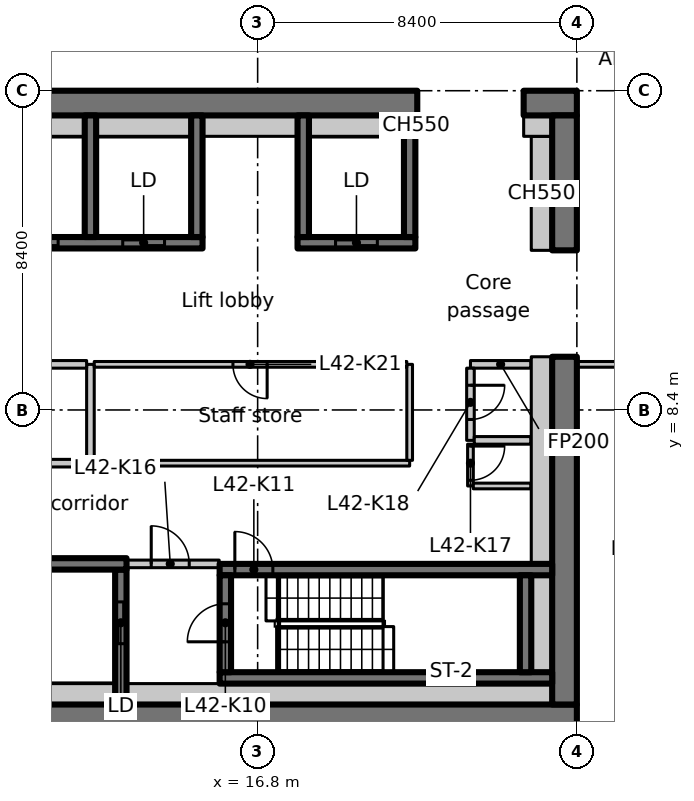
"""IFC4 building model, lengths in metres.
Left out: names, types, materials, properties, quantities, classifications, styles, units other than length and angle.
Written with IfcOpenShell. Run it as: python <this file> out.ifc"""

import sys

from ifc_helpers import new_model, si_unit, direction, frame, frame_2d, origin, place, context, subcontext, project, spatial, rectangle, extrude, element, fill, save


model = new_model("IFC4")
c1 = context("Model", 3, precision=1e-05, world=origin(), true_north=direction((0.0, 1.0)))
c2 = subcontext(c1, "Body", "Model", "MODEL_VIEW")
j1 = project(units=[si_unit("LENGTHUNIT", "METRE"), si_unit("PLANEANGLEUNIT", "RADIAN")], contexts=[c1])
p1 = place(None, origin())
s1 = spatial("IfcSite", under=j1, at=p1, CompositionType="ELEMENT")
p2 = place(p1, origin())
s2 = spatial("IfcBuilding", under=s1, at=p2, CompositionType="ELEMENT")
p3 = place(p2, frame((0.0, 0.0, 170.4)))
s3 = spatial("IfcBuildingStorey", under=s2, at=p3, CompositionType="ELEMENT", Elevation=170.4)
p4 = place(p3, frame((7.286, 0.325, 0.0), z_axis=(0.0, 0.0, 1.0), x_axis=(1.0, 0.0, 0.0)))
e1 = element("IfcWall", 1, at=p4, inside=s3, PredefinedType="SHEAR", context=c2, shape_type="SweptSolid", body=[
    extrude(rectangle(XDim=17.914, YDim=0.65, at=frame_2d((8.957, 0.0))), origin(), (0.0, 0.0, 1.0), 3.35),
])
p5 = place(p3, frame((-1.1, 16.475, 0.0), z_axis=(0.0, 0.0, 1.0), x_axis=(1.0, 0.0, 0.0)))
e2 = element("IfcWall", 2, at=p5, inside=s3, PredefinedType="SHEAR", context=c2, shape_type="SweptSolid", body=[
    extrude(rectangle(XDim=22.1, YDim=0.65, at=frame_2d((11.05, 0.0))), origin(), (0.0, 0.0, 1.0), 3.35),
])
p6 = place(p5, frame((3.15, 0.0, 0.0)))
e3 = element("IfcOpeningElement", 3, at=p6, cuts=e2, PredefinedType="OPENING", context=c2, shape_type="SweptSolid", body=[
    extrude(rectangle(XDim=1.1, YDim=2.3, at=frame_2d((0.55, 1.15))), frame((0.0, 0.335, 0.0), z_axis=(0.0, -1.0, 0.0), x_axis=(1.0, 0.0, 0.0)), (0.0, 0.0, 1.0), 0.67),
])
p7 = place(p3, frame((23.8, 16.475, 0.0), z_axis=(0.0, 0.0, 1.0), x_axis=(1.0, 0.0, 0.0)))
e4 = element("IfcWall", 4, at=p7, inside=s3, PredefinedType="SHEAR", context=c2, shape_type="SweptSolid", body=[
    extrude(rectangle(XDim=1.4, YDim=0.65, at=frame_2d((0.7, 0.0))), origin(), (0.0, 0.0, 1.0), 3.35),
])
p8 = place(p3, frame((24.875, 0.65, 0.0), z_axis=(0.0, 0.0, 1.0), x_axis=(0.0, 1.0, 0.0)))
e5 = element("IfcWall", 5, at=p8, inside=s3, PredefinedType="SHEAR", context=c2, shape_type="SweptSolid", body=[
    extrude(rectangle(XDim=9.15, YDim=0.65, at=frame_2d((4.575, 0.0))), origin(), (0.0, 0.0, 1.0), 3.35),
])
p9 = place(p3, frame((24.875, 12.6, 0.0), z_axis=(0.0, 0.0, 1.0), x_axis=(0.0, 1.0, 0.0)))
e6 = element("IfcWall", 6, at=p9, inside=s3, PredefinedType="SHEAR", context=c2, shape_type="SweptSolid", body=[
    extrude(rectangle(XDim=3.55, YDim=0.65, at=frame_2d((1.775, 0.0))), origin(), (0.0, 0.0, 1.0), 3.35),
])
p10 = place(p3, frame((24.275, 12.6, 0.0), z_axis=(0.0, 0.0, 1.0), x_axis=(0.0, 1.0, 0.0)))
e7 = element("IfcWall", 7, at=p10, inside=s3, PredefinedType="PARTITIONING", context=c2, shape_type="SweptSolid", body=[
    extrude(rectangle(XDim=3.0, YDim=0.55, at=frame_2d((1.5, 0.0))), origin(), (0.0, 0.0, 1.0), 3.35),
])
p11 = place(p3, frame((23.8, 15.875, 0.0), z_axis=(0.0, 0.0, 1.0), x_axis=(1.0, 0.0, 0.0)))
e8 = element("IfcWall", 8, at=p11, inside=s3, PredefinedType="PARTITIONING", context=c2, shape_type="SweptSolid", body=[
    extrude(rectangle(XDim=0.75, YDim=0.55, at=frame_2d((0.375, 0.0))), origin(), (0.0, 0.0, 1.0), 3.35),
])
p12 = place(p3, frame((0.65, 12.8, 0.0), z_axis=(0.0, 0.0, 1.0), x_axis=(1.0, 0.0, 0.0)))
e9 = element("IfcWall", 9, at=p12, inside=s3, PredefinedType="SHEAR", context=c2, shape_type="SweptSolid", body=[
    extrude(rectangle(XDim=14.7, YDim=0.3, at=frame_2d((7.35, 0.0))), origin(), (0.0, 0.0, 1.0), 3.35),
])
p13 = place(p12, frame((4.2, 0.0, 0.0)))
e10 = element("IfcOpeningElement", 10, at=p13, cuts=e9, PredefinedType="OPENING", context=c2, shape_type="SweptSolid", body=[
    extrude(rectangle(XDim=1.1, YDim=2.3, at=frame_2d((0.55, 1.15))), frame((0.0, 0.16, 0.0), z_axis=(0.0, -1.0, 0.0), x_axis=(1.0, 0.0, 0.0)), (0.0, 0.0, 1.0), 0.32),
])
p14 = place(p12, frame((7.0, 0.0, 0.0)))
e11 = element("IfcOpeningElement", 11, at=p14, cuts=e9, PredefinedType="OPENING", context=c2, shape_type="SweptSolid", body=[
    extrude(rectangle(XDim=1.1, YDim=2.3, at=frame_2d((0.55, 1.15))), frame((0.0, 0.16, 0.0), z_axis=(0.0, -1.0, 0.0), x_axis=(1.0, 0.0, 0.0)), (0.0, 0.0, 1.0), 0.32),
])
p15 = place(p12, frame((9.8, 0.0, 0.0)))
e12 = element("IfcOpeningElement", 12, at=p15, cuts=e9, PredefinedType="OPENING", context=c2, shape_type="SweptSolid", body=[
    extrude(rectangle(XDim=1.1, YDim=2.3, at=frame_2d((0.55, 1.15))), frame((0.0, 0.16, 0.0), z_axis=(0.0, -1.0, 0.0), x_axis=(1.0, 0.0, 0.0)), (0.0, 0.0, 1.0), 0.32),
])
p16 = place(p12, frame((12.6, 0.0, 0.0)))
e13 = element("IfcOpeningElement", 13, at=p16, cuts=e9, PredefinedType="OPENING", context=c2, shape_type="SweptSolid", body=[
    extrude(rectangle(XDim=1.1, YDim=2.3, at=frame_2d((0.55, 1.15))), frame((0.0, 0.16, 0.0), z_axis=(0.0, -1.0, 0.0), x_axis=(1.0, 0.0, 0.0)), (0.0, 0.0, 1.0), 0.32),
])
for number, where, z_axis, x_axis in (
    (14, (12.4, 12.95, 0.0), (0.0, 0.0, 1.0), (0.0, 1.0, 0.0)),
    (15, (15.2, 12.95, 0.0), (0.0, 0.0, 1.0), (0.0, 1.0, 0.0)),
):
    element("IfcWall", number, at=place(p3, frame(where, z_axis=z_axis, x_axis=x_axis)), inside=s3, PredefinedType="SHEAR", context=c2, shape_type="SweptSolid", body=[
        extrude(rectangle(XDim=3.2, YDim=0.3, at=frame_2d((1.6, 0.0))), origin(), (0.0, 0.0, 1.0), 3.35),
    ])
p17 = place(p3, frame((17.85, 12.8, 0.0), z_axis=(0.0, 0.0, 1.0), x_axis=(1.0, 0.0, 0.0)))
e16 = element("IfcWall", 16, at=p17, inside=s3, PredefinedType="SHEAR", context=c2, shape_type="SweptSolid", body=[
    extrude(rectangle(XDim=3.1, YDim=0.3, at=frame_2d((1.55, 0.0))), origin(), (0.0, 0.0, 1.0), 3.35),
])
p18 = place(p17, frame((1.0, 0.0, 0.0)))
e17 = element("IfcOpeningElement", 17, at=p18, cuts=e16, PredefinedType="OPENING", context=c2, shape_type="SweptSolid", body=[
    extrude(rectangle(XDim=1.1, YDim=2.3, at=frame_2d((0.55, 1.15))), frame((0.0, 0.16, 0.0), z_axis=(0.0, -1.0, 0.0), x_axis=(1.0, 0.0, 0.0)), (0.0, 0.0, 1.0), 0.32),
])
for number, where, z_axis, x_axis in (
    (18, (18.0, 12.95, 0.0), (0.0, 0.0, 1.0), (0.0, 1.0, 0.0)),
    (19, (20.8, 12.95, 0.0), (0.0, 0.0, 1.0), (0.0, 1.0, 0.0)),
):
    element("IfcWall", number, at=place(p3, frame(where, z_axis=z_axis, x_axis=x_axis)), inside=s3, PredefinedType="SHEAR", context=c2, shape_type="SweptSolid", body=[
        extrude(rectangle(XDim=3.2, YDim=0.3, at=frame_2d((1.6, 0.0))), origin(), (0.0, 0.0, 1.0), 3.35),
    ])
p19 = place(p3, frame((13.2, 0.65, 0.0), z_axis=(0.0, 0.0, 1.0), x_axis=(0.0, 1.0, 0.0)))
e20 = element("IfcWall", 20, at=p19, inside=s3, PredefinedType="SHEAR", context=c2, shape_type="SweptSolid", body=[
    extrude(rectangle(XDim=3.55, YDim=0.3, at=frame_2d((1.775, 0.0))), origin(), (0.0, 0.0, 1.0), 3.35),
])
p20 = place(p19, frame((1.6, 0.0, 0.0)))
e21 = element("IfcOpeningElement", 21, at=p20, cuts=e20, PredefinedType="OPENING", context=c2, shape_type="SweptSolid", body=[
    extrude(rectangle(XDim=1.1, YDim=2.3, at=frame_2d((0.55, 1.15))), frame((0.0, 0.16, 0.0), z_axis=(0.0, -1.0, 0.0), x_axis=(1.0, 0.0, 0.0)), (0.0, 0.0, 1.0), 0.32),
])
p21 = place(p3, frame((10.05, 4.35, 0.0), z_axis=(0.0, 0.0, 1.0), x_axis=(1.0, 0.0, 0.0)))
e22 = element("IfcWall", 22, at=p21, inside=s3, PredefinedType="SHEAR", context=c2, shape_type="SweptSolid", body=[
    extrude(rectangle(XDim=3.3, YDim=0.3, at=frame_2d((1.65, 0.0))), origin(), (0.0, 0.0, 1.0), 3.35),
])
p22 = place(p3, frame((15.8, 1.35, 0.0), z_axis=(0.0, 0.0, 1.0), x_axis=(1.0, 0.0, 0.0)))
e23 = element("IfcWall", 23, at=p22, inside=s3, PredefinedType="SHEAR", context=c2, shape_type="SweptSolid", body=[
    extrude(rectangle(XDim=8.75, YDim=0.3, at=frame_2d((4.375, 0.0))), origin(), (0.0, 0.0, 1.0), 3.35),
])
p23 = place(p3, frame((15.8, 4.2, 0.0), z_axis=(0.0, 0.0, 1.0), x_axis=(1.0, 0.0, 0.0)))
e24 = element("IfcWall", 24, at=p23, inside=s3, PredefinedType="SHEAR", context=c2, shape_type="SweptSolid", body=[
    extrude(rectangle(XDim=8.75, YDim=0.3, at=frame_2d((4.375, 0.0))), origin(), (0.0, 0.0, 1.0), 3.35),
])
p24 = place(p23, frame((0.4, 0.0, 0.0)))
e25 = element("IfcOpeningElement", 25, at=p24, cuts=e24, PredefinedType="OPENING", context=c2, shape_type="SweptSolid", body=[
    extrude(rectangle(XDim=1.0, YDim=2.1, at=frame_2d((0.5, 1.05))), frame((0.0, 0.16, 0.0), z_axis=(0.0, -1.0, 0.0), x_axis=(1.0, 0.0, 0.0)), (0.0, 0.0, 1.0), 0.32),
])
p25 = place(p3, frame((15.95, 1.5, 0.0), z_axis=(0.0, 0.0, 1.0), x_axis=(0.0, 1.0, 0.0)))
e26 = element("IfcWall", 26, at=p25, inside=s3, PredefinedType="SHEAR", context=c2, shape_type="SweptSolid", body=[
    extrude(rectangle(XDim=2.55, YDim=0.3, at=frame_2d((1.275, 0.0))), origin(), (0.0, 0.0, 1.0), 3.35),
])
p26 = place(p25, frame((0.8, 0.0, 0.0)))
e27 = element("IfcOpeningElement", 27, at=p26, cuts=e26, PredefinedType="OPENING", context=c2, shape_type="SweptSolid", body=[
    extrude(rectangle(XDim=1.0, YDim=2.1, at=frame_2d((0.5, 1.05))), frame((0.0, 0.16, 0.0), z_axis=(0.0, -1.0, 0.0), x_axis=(1.0, 0.0, 0.0)), (0.0, 0.0, 1.0), 0.32),
])
p27 = place(p3, frame((23.85, 1.5, 0.0), z_axis=(0.0, 0.0, 1.0), x_axis=(0.0, 1.0, 0.0)))
e28 = element("IfcWall", 28, at=p27, inside=s3, PredefinedType="SHEAR", context=c2, shape_type="SweptSolid", body=[
    extrude(rectangle(XDim=2.55, YDim=0.3, at=frame_2d((1.275, 0.0))), origin(), (0.0, 0.0, 1.0), 3.35),
])
p28 = place(p3, frame((13.362, 4.35, 0.0), z_axis=(0.0, 0.0, 1.0), x_axis=(1.0, 0.0, 0.0)))
e29 = element("IfcWall", 29, at=p28, inside=s3, PredefinedType="PARTITIONING", context=c2, shape_type="SweptSolid", body=[
    extrude(rectangle(XDim=2.426, YDim=0.2, at=frame_2d((1.213, 0.0))), origin(), (0.0, 0.0, 1.0), 3.35),
])
p29 = place(p28, frame((0.638, 0.0, 0.0)))
e30 = element("IfcOpeningElement", 30, at=p29, cuts=e29, PredefinedType="OPENING", context=c2, shape_type="SweptSolid", body=[
    extrude(rectangle(XDim=1.0, YDim=2.1, at=frame_2d((0.5, 1.05))), frame((0.0, 0.11, 0.0), z_axis=(0.0, -1.0, 0.0), x_axis=(1.0, 0.0, 0.0)), (0.0, 0.0, 1.0), 0.22),
])
p30 = place(p3, frame((23.988, 9.6, 0.0), z_axis=(0.0, 0.0, 1.0), x_axis=(-1.0, 0.0, 0.0)))
e31 = element("IfcWall", 31, at=p30, inside=s3, PredefinedType="PARTITIONING", context=c2, shape_type="SweptSolid", body=[
    extrude(rectangle(XDim=1.588, YDim=0.2, at=frame_2d((0.794, 0.0))), origin(), (0.0, 0.0, 1.0), 3.35),
])
p31 = place(p3, frame((22.4, 9.5, 0.0), z_axis=(0.0, 0.0, 1.0), x_axis=(0.0, -1.0, 0.0)))
e32 = element("IfcWall", 32, at=p31, inside=s3, PredefinedType="PARTITIONING", context=c2, shape_type="SweptSolid", body=[
    extrude(rectangle(XDim=1.9, YDim=0.2, at=frame_2d((0.95, 0.0))), origin(), (0.0, 0.0, 1.0), 3.35),
])
p32 = place(p31, frame((0.45, 0.0, 0.0)))
e33 = element("IfcOpeningElement", 33, at=p32, cuts=e32, PredefinedType="OPENING", context=c2, shape_type="SweptSolid", body=[
    extrude(rectangle(XDim=0.9, YDim=2.1, at=frame_2d((0.45, 1.05))), frame((0.0, 0.11, 0.0), z_axis=(0.0, -1.0, 0.0), x_axis=(1.0, 0.0, 0.0)), (0.0, 0.0, 1.0), 0.22),
])
p33 = place(p3, frame((22.5, 7.6, 0.0), z_axis=(0.0, 0.0, 1.0), x_axis=(1.0, 0.0, 0.0)))
e34 = element("IfcWall", 34, at=p33, inside=s3, PredefinedType="PARTITIONING", context=c2, shape_type="SweptSolid", body=[
    extrude(rectangle(XDim=1.488, YDim=0.2, at=frame_2d((0.744, 0.0))), origin(), (0.0, 0.0, 1.0), 3.35),
])
p34 = place(p3, frame((6.8, 7.0, 0.0), z_axis=(0.0, 0.0, 1.0), x_axis=(1.0, 0.0, 0.0)))
e35 = element("IfcWall", 35, at=p34, inside=s3, PredefinedType="PARTITIONING", context=c2, shape_type="SweptSolid", body=[
    extrude(rectangle(XDim=5.6, YDim=0.2, at=frame_2d((2.8, 0.0))), origin(), (0.0, 0.0, 1.0), 3.35),
])
p35 = place(p3, frame((12.4, 7.1, 0.0), z_axis=(0.0, 0.0, 1.0), x_axis=(0.0, 1.0, 0.0)))
e36 = element("IfcWall", 36, at=p35, inside=s3, PredefinedType="PARTITIONING", context=c2, shape_type="SweptSolid", body=[
    extrude(rectangle(XDim=2.5, YDim=0.2, at=frame_2d((1.25, 0.0))), origin(), (0.0, 0.0, 1.0), 3.35),
])
p36 = place(p3, frame((12.3, 9.6, 0.0), z_axis=(0.0, 0.0, 1.0), x_axis=(-1.0, 0.0, 0.0)))
e37 = element("IfcWall", 37, at=p36, inside=s3, PredefinedType="PARTITIONING", context=c2, shape_type="SweptSolid", body=[
    extrude(rectangle(XDim=5.5, YDim=0.2, at=frame_2d((2.75, 0.0))), origin(), (0.0, 0.0, 1.0), 3.35),
])
p37 = place(p36, frame((2.25, 0.0, 0.0)))
e38 = element("IfcOpeningElement", 38, at=p37, cuts=e37, PredefinedType="OPENING", context=c2, shape_type="SweptSolid", body=[
    extrude(rectangle(XDim=0.9, YDim=2.1, at=frame_2d((0.45, 1.05))), frame((0.0, 0.11, 0.0), z_axis=(0.0, -1.0, 0.0), x_axis=(1.0, 0.0, 0.0)), (0.0, 0.0, 1.0), 0.22),
])
p38 = place(p3, frame((12.5, 7.0, 0.0), z_axis=(0.0, 0.0, 1.0), x_axis=(1.0, 0.0, 0.0)))
e39 = element("IfcWall", 39, at=p38, inside=s3, PredefinedType="PARTITIONING", context=c2, shape_type="SweptSolid", body=[
    extrude(rectangle(XDim=8.3, YDim=0.15, at=frame_2d((4.15, 0.0))), origin(), (0.0, 0.0, 1.0), 3.35),
])
p39 = place(p3, frame((20.8, 7.075, 0.0), z_axis=(0.0, 0.0, 1.0), x_axis=(0.0, 1.0, 0.0)))
e40 = element("IfcWall", 40, at=p39, inside=s3, PredefinedType="PARTITIONING", context=c2, shape_type="SweptSolid", body=[
    extrude(rectangle(XDim=2.525, YDim=0.15, at=frame_2d((1.263, 0.0))), origin(), (0.0, 0.0, 1.0), 3.35),
])
p40 = place(p3, frame((20.725, 9.6, 0.0), z_axis=(0.0, 0.0, 1.0), x_axis=(-1.0, 0.0, 0.0)))
e41 = element("IfcWall", 41, at=p40, inside=s3, PredefinedType="PARTITIONING", context=c2, shape_type="SweptSolid", body=[
    extrude(rectangle(XDim=8.225, YDim=0.15, at=frame_2d((4.113, 0.0))), origin(), (0.0, 0.0, 1.0), 3.35),
])
p41 = place(p40, frame((3.675, 0.0, 0.0)))
e42 = element("IfcOpeningElement", 42, at=p41, cuts=e41, PredefinedType="OPENING", context=c2, shape_type="SweptSolid", body=[
    extrude(rectangle(XDim=0.9, YDim=2.1, at=frame_2d((0.45, 1.05))), frame((0.0, 0.085, 0.0), z_axis=(0.0, -1.0, 0.0), x_axis=(1.0, 0.0, 0.0)), (0.0, 0.0, 1.0), 0.17),
])
p42 = place(p3, frame((22.4, 7.5, 0.0), z_axis=(0.0, 0.0, 1.0), x_axis=(0.0, -1.0, 0.0)))
e43 = element("IfcWall", 43, at=p42, inside=s3, PredefinedType="PARTITIONING", context=c2, shape_type="SweptSolid", body=[
    extrude(rectangle(XDim=1.1, YDim=0.15, at=frame_2d((0.55, 0.0))), origin(), (0.0, 0.0, 1.0), 3.35),
])
p43 = place(p42, frame((0.05, 0.0, 0.0)))
e44 = element("IfcOpeningElement", 44, at=p43, cuts=e43, PredefinedType="OPENING", context=c2, shape_type="SweptSolid", body=[
    extrude(rectangle(XDim=0.9, YDim=2.1, at=frame_2d((0.45, 1.05))), frame((0.0, 0.085, 0.0), z_axis=(0.0, -1.0, 0.0), x_axis=(1.0, 0.0, 0.0)), (0.0, 0.0, 1.0), 0.17),
])
p44 = place(p3, frame((22.475, 6.4, 0.0), z_axis=(0.0, 0.0, 1.0), x_axis=(1.0, 0.0, 0.0)))
e45 = element("IfcWall", 45, at=p44, inside=s3, PredefinedType="PARTITIONING", context=c2, shape_type="SweptSolid", body=[
    extrude(rectangle(XDim=1.513, YDim=0.15, at=frame_2d((0.756, 0.0))), origin(), (0.0, 0.0, 1.0), 3.35),
])
for number, where, z_axis, x_axis in (
    (46, (9.75, 15.875, 0.0), (0.0, 0.0, 1.0), (1.0, 0.0, 0.0)),
    (47, (12.55, 15.875, 0.0), (0.0, 0.0, 1.0), (1.0, 0.0, 0.0)),
    (48, (15.35, 15.875, 0.0), (0.0, 0.0, 1.0), (1.0, 0.0, 0.0)),
    (49, (18.15, 15.875, 0.0), (0.0, 0.0, 1.0), (1.0, 0.0, 0.0)),
):
    element("IfcWall", number, at=place(p3, frame(where, z_axis=z_axis, x_axis=x_axis)), inside=s3, PredefinedType="PARTITIONING", context=c2, shape_type="SweptSolid", body=[
        extrude(rectangle(XDim=2.5, YDim=0.55, at=frame_2d((1.25, 0.0))), origin(), (0.0, 0.0, 1.0), 3.35),
    ])
p45 = place(p3, frame((20.95, 15.875, 0.0), z_axis=(0.0, 0.0, 1.0), x_axis=(1.0, 0.0, 0.0)))
e50 = element("IfcWall", 50, at=p45, inside=s3, PredefinedType="PARTITIONING", context=c2, shape_type="SweptSolid", body=[
    extrude(rectangle(XDim=0.05, YDim=0.55, at=frame_2d((0.025, 0.0))), origin(), (0.0, 0.0, 1.0), 3.35),
])
p46 = place(p3, frame((10.35, 0.925, 0.0), z_axis=(0.0, 0.0, 1.0), x_axis=(1.0, 0.0, 0.0)))
e51 = element("IfcWall", 51, at=p46, inside=s3, PredefinedType="PARTITIONING", context=c2, shape_type="SweptSolid", body=[
    extrude(rectangle(XDim=2.7, YDim=0.55, at=frame_2d((1.35, 0.0))), origin(), (0.0, 0.0, 1.0), 3.35),
])
p47 = place(p3, frame((13.35, 0.925, 0.0), z_axis=(0.0, 0.0, 1.0), x_axis=(1.0, 0.0, 0.0)))
e52 = element("IfcWall", 52, at=p47, inside=s3, PredefinedType="PARTITIONING", context=c2, shape_type="SweptSolid", body=[
    extrude(rectangle(XDim=11.2, YDim=0.55, at=frame_2d((5.6, 0.0))), origin(), (0.0, 0.0, 1.0), 3.35),
])
p48 = place(p3, frame((24.275, 1.5, 0.0), z_axis=(0.0, 0.0, 1.0), x_axis=(0.0, 1.0, 0.0)))
e53 = element("IfcWall", 53, at=p48, inside=s3, PredefinedType="PARTITIONING", context=c2, shape_type="SweptSolid", body=[
    extrude(rectangle(XDim=2.55, YDim=0.55, at=frame_2d((1.275, 0.0))), origin(), (0.0, 0.0, 1.0), 3.35),
])
p49 = place(p3, frame((24.275, 4.35, 0.0), z_axis=(0.0, 0.0, 1.0), x_axis=(0.0, 1.0, 0.0)))
e54 = element("IfcWall", 54, at=p49, inside=s3, PredefinedType="PARTITIONING", context=c2, shape_type="SweptSolid", body=[
    extrude(rectangle(XDim=5.45, YDim=0.55, at=frame_2d((2.725, 0.0))), origin(), (0.0, 0.0, 1.0), 3.35),
])
p50 = place(p3, frame((29.4, 9.6, 0.0), z_axis=(0.0, 0.0, 1.0), x_axis=(-1.0, 0.0, 0.0)))
e55 = element("IfcWall", 55, at=p50, inside=s3, PredefinedType="PARTITIONING", context=c2, shape_type="SweptSolid", body=[
    extrude(rectangle(XDim=4.2, YDim=0.15, at=frame_2d((2.1, 0.0))), origin(), (0.0, 0.0, 1.0), 3.33),
])
p51 = place(p50, frame((1.5, 0.0, 0.0)))
e56 = element("IfcOpeningElement", 56, at=p51, cuts=e55, PredefinedType="OPENING", context=c2, shape_type="SweptSolid", body=[
    extrude(rectangle(XDim=1.1, YDim=2.1, at=frame_2d((0.55, 1.05))), frame((0.0, 0.085, 0.0), z_axis=(0.0, -1.0, 0.0), x_axis=(1.0, 0.0, 0.0)), (0.0, 0.0, 1.0), 0.17),
])
p52 = place(p15, origin())
e57 = element("IfcDoor", 57, at=p52, inside=s3, OperationType="SLIDING_TO_LEFT", PredefinedType="DOOR", context=c2, shape_type="SweptSolid", body=[
    extrude(rectangle(XDim=1.1, YDim=2.3, at=frame_2d((0.55, 1.15))), frame((0.0, 0.025, 0.0), z_axis=(0.0, -1.0, 0.0), x_axis=(1.0, 0.0, 0.0)), (0.0, 0.0, 1.0), 0.05),
])
fill(e12, e57)
p53 = place(p16, origin())
e58 = element("IfcDoor", 58, at=p53, inside=s3, OperationType="SLIDING_TO_LEFT", PredefinedType="DOOR", context=c2, shape_type="SweptSolid", body=[
    extrude(rectangle(XDim=1.1, YDim=2.3, at=frame_2d((0.55, 1.15))), frame((0.0, 0.025, 0.0), z_axis=(0.0, -1.0, 0.0), x_axis=(1.0, 0.0, 0.0)), (0.0, 0.0, 1.0), 0.05),
])
fill(e13, e58)
p54 = place(p18, origin())
e59 = element("IfcDoor", 59, at=p54, inside=s3, OperationType="SLIDING_TO_LEFT", PredefinedType="DOOR", context=c2, shape_type="SweptSolid", body=[
    extrude(rectangle(XDim=1.1, YDim=2.3, at=frame_2d((0.55, 1.15))), frame((0.0, 0.025, 0.0), z_axis=(0.0, -1.0, 0.0), x_axis=(1.0, 0.0, 0.0)), (0.0, 0.0, 1.0), 0.05),
])
fill(e17, e59)
p55 = place(p20, origin())
e60 = element("IfcDoor", 60, at=p55, inside=s3, OperationType="SLIDING_TO_LEFT", PredefinedType="DOOR", context=c2, shape_type="SweptSolid", body=[
    extrude(rectangle(XDim=1.1, YDim=2.3, at=frame_2d((0.55, 1.15))), frame((0.0, 0.025, 0.0), z_axis=(0.0, -1.0, 0.0), x_axis=(1.0, 0.0, 0.0)), (0.0, 0.0, 1.0), 0.05),
])
fill(e21, e60)
p56 = place(p26, origin())
e61 = element("IfcDoor", 61, at=p56, inside=s3, OperationType="SINGLE_SWING_LEFT", PredefinedType="DOOR", context=c2, shape_type="SweptSolid", body=[
    extrude(rectangle(XDim=1.0, YDim=2.1, at=frame_2d((0.5, 1.05))), frame((0.0, 0.025, 0.0), z_axis=(0.0, -1.0, 0.0), x_axis=(1.0, 0.0, 0.0)), (0.0, 0.0, 1.0), 0.05),
])
fill(e27, e61)
p57 = place(p24, origin())
e62 = element("IfcDoor", 62, at=p57, inside=s3, OperationType="SINGLE_SWING_RIGHT", PredefinedType="DOOR", context=c2, shape_type="SweptSolid", body=[
    extrude(rectangle(XDim=1.0, YDim=2.1, at=frame_2d((0.5, 1.05))), frame((0.0, 0.025, 0.0), z_axis=(0.0, -1.0, 0.0), x_axis=(1.0, 0.0, 0.0)), (0.0, 0.0, 1.0), 0.05),
])
fill(e25, e62)
p58 = place(p29, origin())
e63 = element("IfcDoor", 63, at=p58, inside=s3, OperationType="SINGLE_SWING_LEFT", PredefinedType="DOOR", context=c2, shape_type="SweptSolid", body=[
    extrude(rectangle(XDim=1.0, YDim=2.1, at=frame_2d((0.5, 1.05))), frame((0.0, 0.025, 0.0), z_axis=(0.0, -1.0, 0.0), x_axis=(1.0, 0.0, 0.0)), (0.0, 0.0, 1.0), 0.05),
])
fill(e30, e63)
p59 = place(p43, origin())
e64 = element("IfcDoor", 64, at=p59, inside=s3, OperationType="SINGLE_SWING_RIGHT", PredefinedType="DOOR", context=c2, shape_type="SweptSolid", body=[
    extrude(rectangle(XDim=0.9, YDim=2.1, at=frame_2d((0.45, 1.05))), frame((0.0, 0.025, 0.0), z_axis=(0.0, -1.0, 0.0), x_axis=(1.0, 0.0, 0.0)), (0.0, 0.0, 1.0), 0.05),
])
fill(e44, e64)
p60 = place(p32, origin())
e65 = element("IfcDoor", 65, at=p60, inside=s3, OperationType="SINGLE_SWING_LEFT", PredefinedType="DOOR", context=c2, shape_type="SweptSolid", body=[
    extrude(rectangle(XDim=0.9, YDim=2.1, at=frame_2d((0.45, 1.05))), frame((0.0, 0.025, 0.0), z_axis=(0.0, -1.0, 0.0), x_axis=(1.0, 0.0, 0.0)), (0.0, 0.0, 1.0), 0.05),
])
fill(e33, e65)
p61 = place(p41, origin())
e66 = element("IfcDoor", 66, at=p61, inside=s3, OperationType="SINGLE_SWING_RIGHT", PredefinedType="DOOR", context=c2, shape_type="SweptSolid", body=[
    extrude(rectangle(XDim=0.9, YDim=2.1, at=frame_2d((0.45, 1.05))), frame((0.0, 0.025, 0.0), z_axis=(0.0, -1.0, 0.0), x_axis=(1.0, 0.0, 0.0)), (0.0, 0.0, 1.0), 0.05),
])
fill(e42, e66)
save(model, sys.argv[1])
